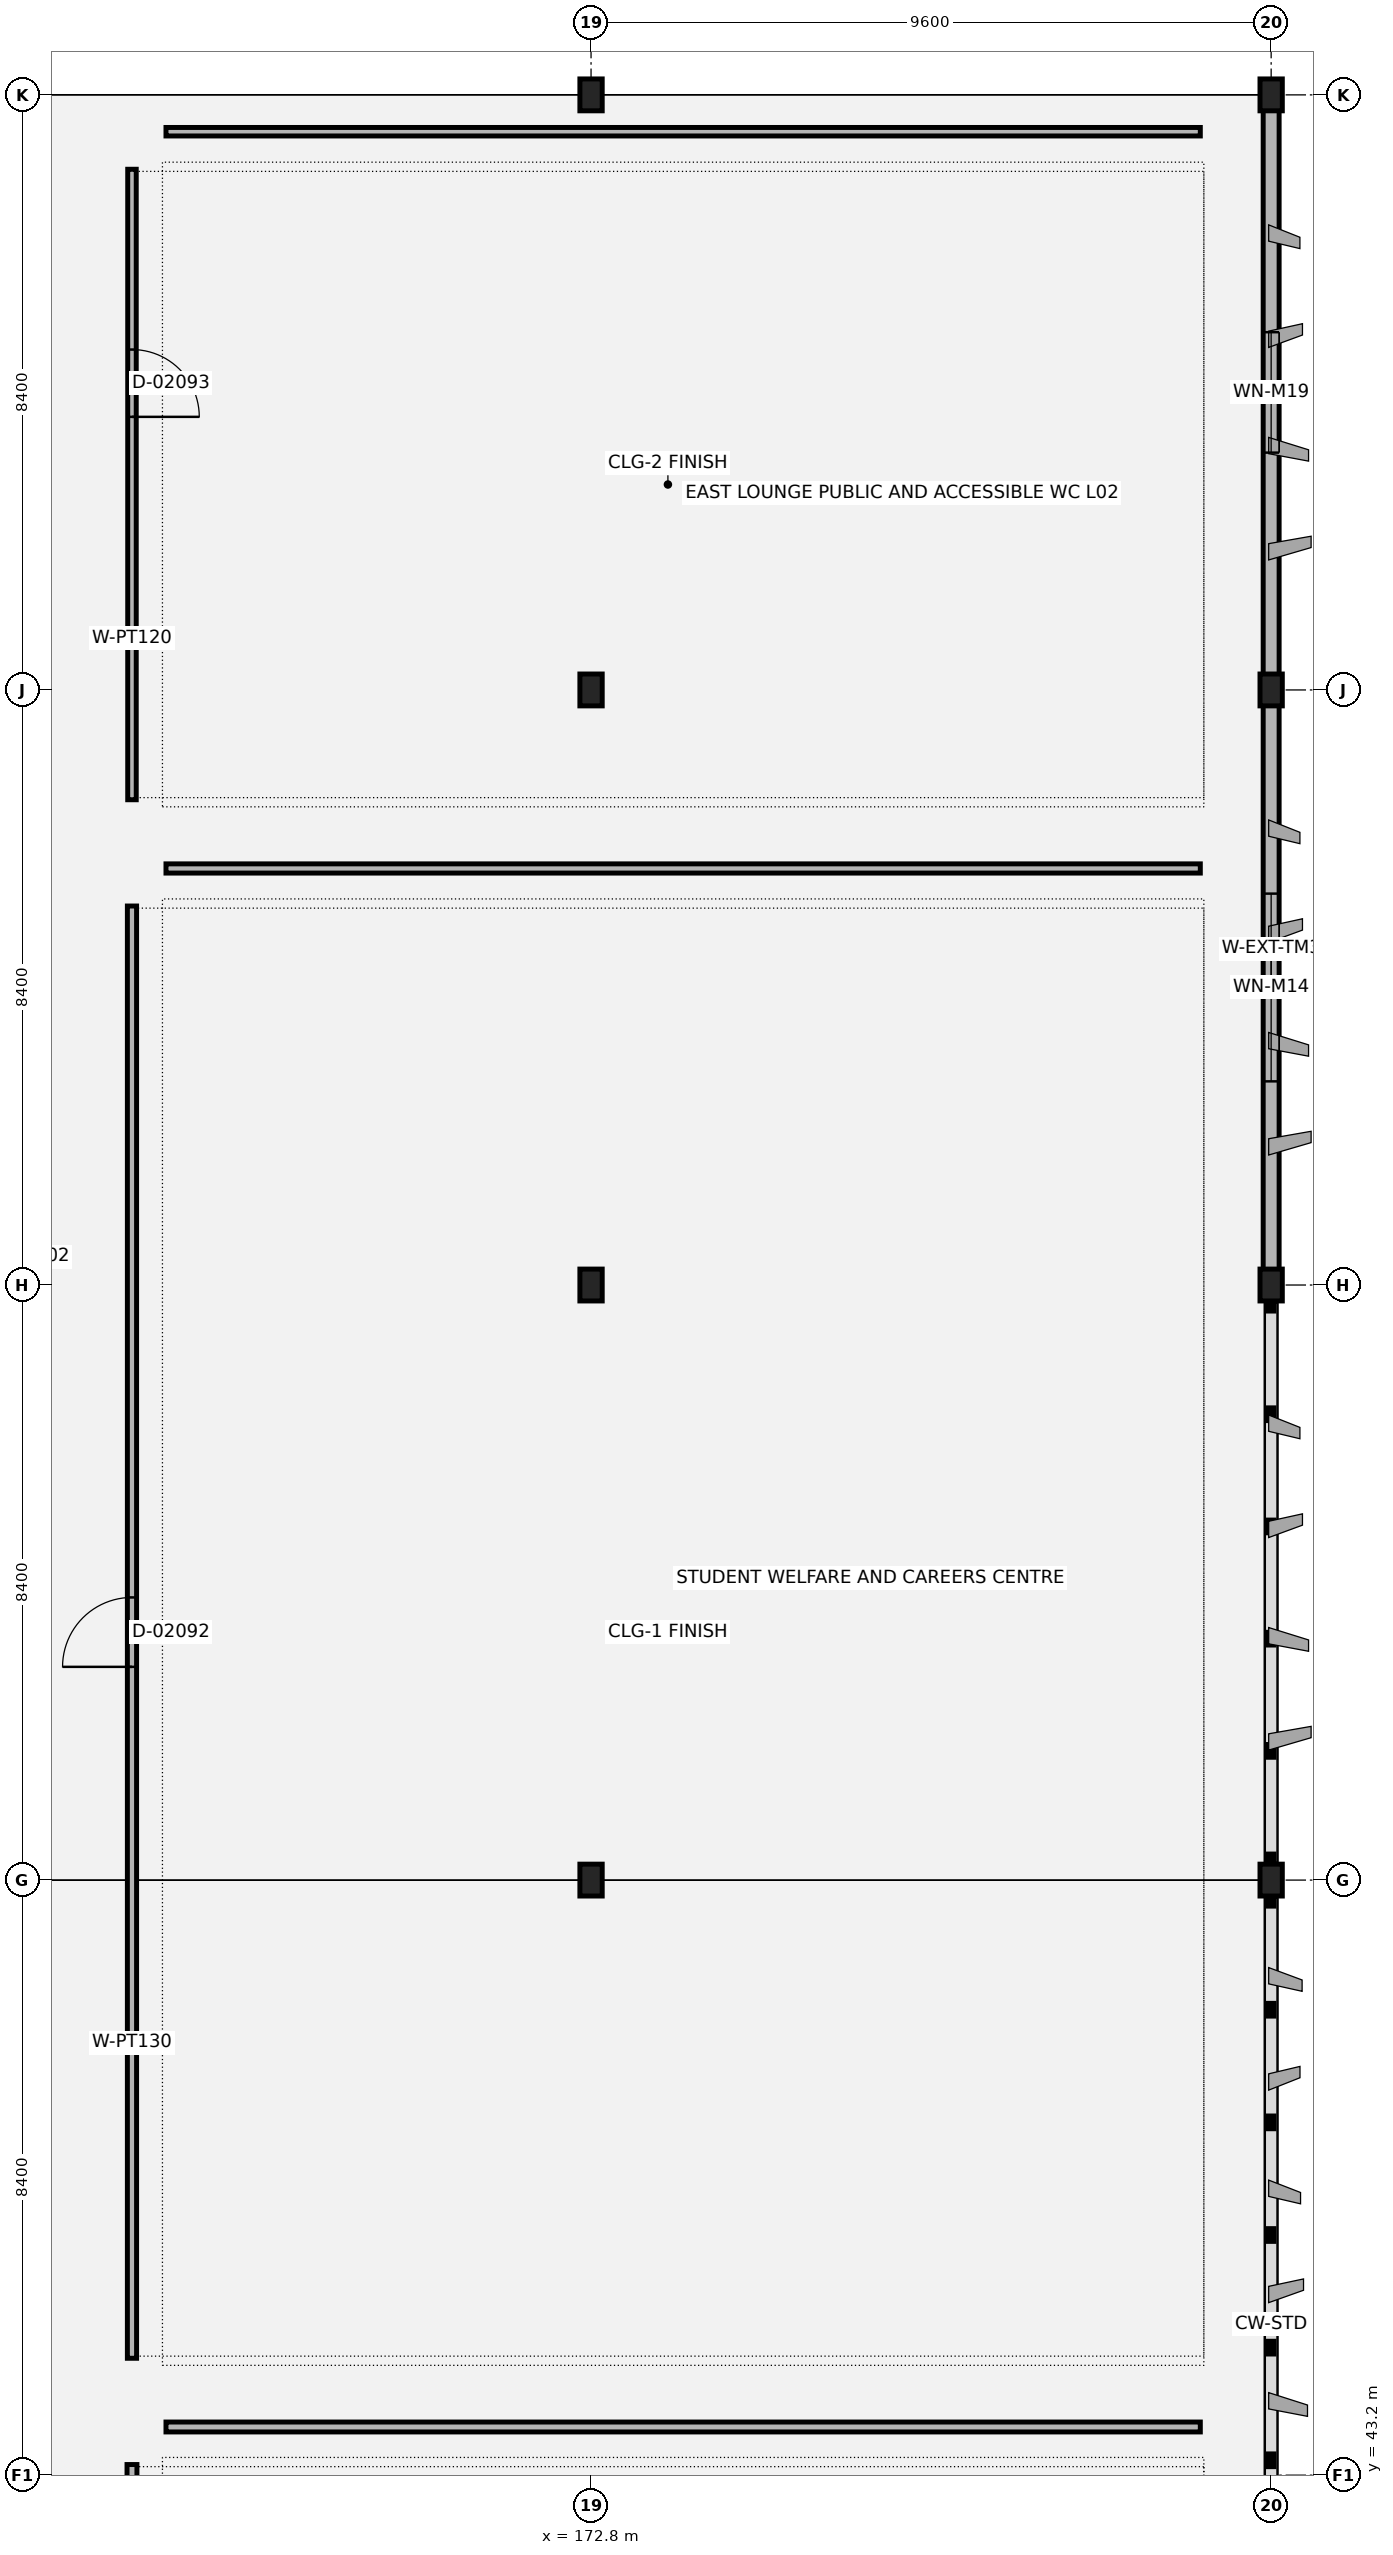
"""IFC4 building model, lengths in metres.
Left out: names, types, materials, properties, quantities, classifications, styles, units other than length and angle.
Written with IfcOpenShell. Run it as: python <this file> out.ifc"""

import sys

from ifc_helpers import new_model, si_unit, direction, frame, frame_2d, origin, origin_2d, place, context, subcontext, project, spatial, rectangle, extrude, element, fill, save


model = new_model("IFC4")
c1 = context("Model", 3, precision=1e-05, world=origin(), true_north=direction((0.0, 1.0)))
c2 = subcontext(c1, "Body", "Model", "MODEL_VIEW")
j1 = project(units=[si_unit("LENGTHUNIT", "METRE"), si_unit("PLANEANGLEUNIT", "RADIAN")], contexts=[c1])
p1 = place(None, origin())
s1 = spatial("IfcSite", under=j1, at=p1, CompositionType="ELEMENT")
p2 = place(p1, origin())
s2 = spatial("IfcBuilding", under=s1, at=p2, CompositionType="ELEMENT")
p3 = place(p2, frame((0.0, 0.0, 10.2)))
s3 = spatial("IfcBuildingStorey", under=s2, at=p3, CompositionType="ELEMENT", Elevation=10.2)
for number, where, z_axis, x_axis in (
    (1, (172.8, 51.6, 0.0), (0.0, 0.0, 1.0), (1.0, 0.0, 0.0)),
    (2, (172.8, 60.0, 0.0), (0.0, 0.0, 1.0), (1.0, 0.0, 0.0)),
    (3, (172.8, 68.4, 0.0), (0.0, 0.0, 1.0), (1.0, 0.0, 0.0)),
    (4, (172.8, 76.8, 0.0), (0.0, 0.0, 1.0), (1.0, 0.0, 0.0)),
):
    element("IfcColumn", number, at=place(p3, frame(where, z_axis=z_axis, x_axis=x_axis)), inside=s3, PredefinedType="COLUMN", context=c2, shape_type="SweptSolid", body=[
        extrude(rectangle(XDim=0.315, YDim=0.45, at=origin_2d()), origin(), (0.0, 0.0, 1.0), 6.165),
    ])
for number, where, z_axis, x_axis in (
    (5, (182.4, 51.6, 0.0), (0.0, 0.0, 1.0), (1.0, 0.0, 0.0)),
    (6, (182.4, 60.0, 0.0), (0.0, 0.0, 1.0), (1.0, 0.0, 0.0)),
    (7, (182.4, 68.4, 0.0), (0.0, 0.0, 1.0), (1.0, 0.0, 0.0)),
    (8, (182.4, 76.8, 0.0), (0.0, 0.0, 1.0), (1.0, 0.0, 0.0)),
):
    element("IfcColumn", number, at=place(p3, frame(where, z_axis=z_axis, x_axis=x_axis)), inside=s3, PredefinedType="COLUMN", context=c2, shape_type="SweptSolid", body=[
        extrude(rectangle(XDim=0.315, YDim=0.45, at=origin_2d()), origin(), (0.0, 0.0, 1.0), 7.257),
    ])
p4 = place(p3, frame((182.4, 60.2, 0.0), z_axis=(0.0, 0.0, 1.0), x_axis=(0.0, 1.0, 0.0)))
e9 = element("IfcWall", 9, at=p4, inside=s3, PredefinedType="SOLIDWALL", context=c2, shape_type="SweptSolid", body=[
    extrude(rectangle(XDim=8.0, YDim=0.225, at=frame_2d((4.0, 0.0))), origin(), (0.0, 0.0, 1.0), 3.8),
])
p5 = place(p4, frame((2.675, 0.0, 0.9)))
e10 = element("IfcOpeningElement", 10, at=p5, cuts=e9, PredefinedType="OPENING", context=c2, shape_type="SweptSolid", body=[
    extrude(rectangle(XDim=2.65, YDim=1.75, at=frame_2d((1.325, 0.875))), frame((0.0, 0.123, 0.0), z_axis=(0.0, -1.0, 0.0), x_axis=(1.0, 0.0, 0.0)), (0.0, 0.0, 1.0), 0.245),
])
p6 = place(p3, frame((182.4, 68.6, 0.0), z_axis=(0.0, 0.0, 1.0), x_axis=(0.0, 1.0, 0.0)))
e11 = element("IfcWall", 11, at=p6, inside=s3, PredefinedType="SOLIDWALL", context=c2, shape_type="SweptSolid", body=[
    extrude(rectangle(XDim=8.0, YDim=0.225, at=frame_2d((4.0, 0.0))), origin(), (0.0, 0.0, 1.0), 3.8),
])
p7 = place(p6, frame((3.15, 0.0, 0.9)))
e12 = element("IfcOpeningElement", 12, at=p7, cuts=e11, PredefinedType="OPENING", context=c2, shape_type="SweptSolid", body=[
    extrude(rectangle(XDim=1.7, YDim=1.45, at=frame_2d((0.85, 0.725))), frame((0.0, 0.123, 0.0), z_axis=(0.0, -1.0, 0.0), x_axis=(1.0, 0.0, 0.0)), (0.0, 0.0, 1.0), 0.245),
])
p8 = place(p3, frame((166.32, 14.25, 0.0), z_axis=(0.0, 0.0, 1.0), x_axis=(0.0, 1.0, 0.0)))
e13 = element("IfcWall", 13, at=p8, inside=s3, PredefinedType="PARTITIONING", context=c2, shape_type="SweptSolid", body=[
    extrude(rectangle(XDim=29.1, YDim=0.14, at=frame_2d((14.55, 0.0))), origin(), (0.0, 0.0, 1.0), 3.03),
])
p9 = place(p8, frame((19.482, 0.0, 0.0)))
e14 = element("IfcOpeningElement", 14, at=p9, cuts=e13, PredefinedType="OPENING", context=c2, shape_type="SweptSolid", body=[
    extrude(rectangle(XDim=1.04, YDim=2.15, at=frame_2d((0.52, 1.075))), frame((0.0, 0.08, 0.0), z_axis=(0.0, -1.0, 0.0), x_axis=(1.0, 0.0, 0.0)), (0.0, 0.0, 1.0), 0.16),
])
p10 = place(p3, frame((166.8, 43.88, 0.0), z_axis=(0.0, 0.0, 1.0), x_axis=(1.0, 0.0, 0.0)))
e15 = element("IfcWall", 15, at=p10, inside=s3, PredefinedType="PARTITIONING", context=c2, shape_type="SweptSolid", body=[
    extrude(rectangle(XDim=14.6, YDim=0.14, at=frame_2d((7.3, 0.0))), origin(), (0.0, 0.0, 1.0), 3.03),
])
p11 = place(p3, frame((166.32, 44.85, 0.0), z_axis=(0.0, 0.0, 1.0), x_axis=(0.0, 1.0, 0.0)))
e16 = element("IfcWall", 16, at=p11, inside=s3, PredefinedType="PARTITIONING", context=c2, shape_type="SweptSolid", body=[
    extrude(rectangle(XDim=20.5, YDim=0.13, at=frame_2d((10.25, 0.0))), origin(), (0.0, 0.0, 1.0), 3.03),
])
p12 = place(p11, frame((9.76, 0.0, 0.0)))
e17 = element("IfcOpeningElement", 17, at=p12, cuts=e16, PredefinedType="OPENING", context=c2, shape_type="SweptSolid", body=[
    extrude(rectangle(XDim=0.98, YDim=2.1, at=frame_2d((0.49, 1.05))), frame((0.0, 0.075, 0.0), z_axis=(0.0, -1.0, 0.0), x_axis=(1.0, 0.0, 0.0)), (0.0, 0.0, 1.0), 0.15),
])
p13 = place(p3, frame((166.8, 65.88, 0.0), z_axis=(0.0, 0.0, 1.0), x_axis=(1.0, 0.0, 0.0)))
e18 = element("IfcWall", 18, at=p13, inside=s3, PredefinedType="PARTITIONING", context=c2, shape_type="SweptSolid", body=[
    extrude(rectangle(XDim=14.6, YDim=0.13, at=frame_2d((7.3, 0.0))), origin(), (0.0, 0.0, 1.0), 3.03),
])
p14 = place(p3, frame((166.32, 66.85, 0.0), z_axis=(0.0, 0.0, 1.0), x_axis=(0.0, 1.0, 0.0)))
e19 = element("IfcWall", 19, at=p14, inside=s3, PredefinedType="PARTITIONING", context=c2, shape_type="SweptSolid", body=[
    extrude(rectangle(XDim=8.9, YDim=0.12, at=frame_2d((4.45, 0.0))), origin(), (0.0, 0.0, 1.0), 3.03),
])
p15 = place(p14, frame((5.405, 0.0, 0.0)))
e20 = element("IfcOpeningElement", 20, at=p15, cuts=e19, PredefinedType="OPENING", context=c2, shape_type="SweptSolid", body=[
    extrude(rectangle(XDim=0.95, YDim=2.1, at=frame_2d((0.475, 1.05))), frame((0.0, 0.07, 0.0), z_axis=(0.0, -1.0, 0.0), x_axis=(1.0, 0.0, 0.0)), (0.0, 0.0, 1.0), 0.14),
])
p16 = place(p3, frame((166.8, 76.28, 0.0), z_axis=(0.0, 0.0, 1.0), x_axis=(1.0, 0.0, 0.0)))
e21 = element("IfcWall", 21, at=p16, inside=s3, PredefinedType="PARTITIONING", context=c2, shape_type="SweptSolid", body=[
    extrude(rectangle(XDim=14.6, YDim=0.12, at=frame_2d((7.3, 0.0))), origin(), (0.0, 0.0, 1.0), 3.03),
])
p17 = place(p5, origin())
e22 = element("IfcWindow", 22, at=p17, inside=s3, PartitioningType="SINGLE_PANEL", PredefinedType="WINDOW", context=c2, shape_type="SweptSolid", body=[
    extrude(rectangle(XDim=2.65, YDim=1.75, at=frame_2d((1.325, 0.875))), frame((0.0, 0.03, 0.0), z_axis=(0.0, -1.0, 0.0), x_axis=(1.0, 0.0, 0.0)), (0.0, 0.0, 1.0), 0.06),
])
fill(e10, e22)
p18 = place(p7, origin())
e23 = element("IfcWindow", 23, at=p18, inside=s3, PartitioningType="SINGLE_PANEL", PredefinedType="WINDOW", context=c2, shape_type="SweptSolid", body=[
    extrude(rectangle(XDim=1.7, YDim=1.45, at=frame_2d((0.85, 0.725))), frame((0.0, 0.03, 0.0), z_axis=(0.0, -1.0, 0.0), x_axis=(1.0, 0.0, 0.0)), (0.0, 0.0, 1.0), 0.06),
])
fill(e12, e23)
p19 = place(p12, origin())
e24 = element("IfcDoor", 24, at=p19, inside=s3, OperationType="SINGLE_SWING_LEFT", PredefinedType="DOOR", context=c2, shape_type="SweptSolid", body=[
    extrude(rectangle(XDim=0.98, YDim=2.1, at=frame_2d((0.49, 1.05))), frame((0.0, 0.025, 0.0), z_axis=(0.0, -1.0, 0.0), x_axis=(1.0, 0.0, 0.0)), (0.0, 0.0, 1.0), 0.05),
])
fill(e17, e24)
p20 = place(p15, origin())
e25 = element("IfcDoor", 25, at=p20, inside=s3, OperationType="SINGLE_SWING_RIGHT", PredefinedType="DOOR", context=c2, shape_type="SweptSolid", body=[
    extrude(rectangle(XDim=0.95, YDim=2.1, at=frame_2d((0.475, 1.05))), frame((0.0, 0.025, 0.0), z_axis=(0.0, -1.0, 0.0), x_axis=(1.0, 0.0, 0.0)), (0.0, 0.0, 1.0), 0.05),
])
fill(e20, e25)
save(model, sys.argv[1])
